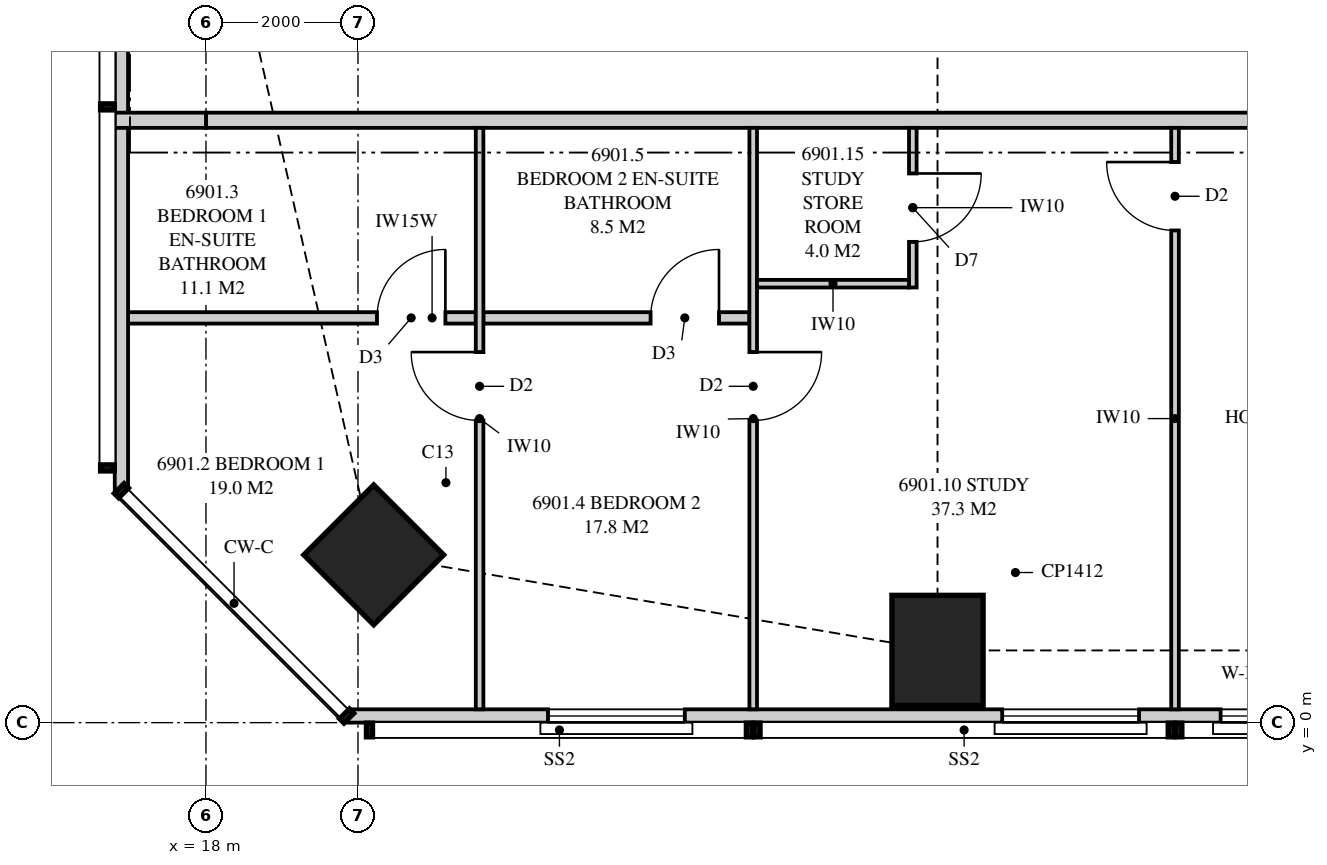
"""IFC4 building model, lengths in metres.
Left out: names, types, materials, properties, quantities, classifications, styles, units other than length and angle.
Written with IfcOpenShell. Run it as: python <this file> out.ifc"""

import sys

from ifc_helpers import new_model, si_unit, direction, frame, frame_2d, origin, origin_2d, place, context, subcontext, project, spatial, polyline, rectangle, outline, extrude, element, fill, save


model = new_model("IFC4")
c1 = context("Model", 3, precision=1e-05, world=origin(), true_north=direction((0.0, 1.0)))
c2 = subcontext(c1, "Body", "Model", "MODEL_VIEW")
j1 = project(units=[si_unit("LENGTHUNIT", "METRE"), si_unit("PLANEANGLEUNIT", "RADIAN")], contexts=[c1])
p1 = place(None, origin())
s1 = spatial("IfcSite", under=j1, at=p1, CompositionType="ELEMENT")
p2 = place(p1, origin())
s2 = spatial("IfcBuilding", under=s1, at=p2, CompositionType="ELEMENT")
p3 = place(p2, frame((0.0, 0.0, 252.95)))
s3 = spatial("IfcBuildingStorey", under=s2, at=p3, CompositionType="ELEMENT", Elevation=252.95)
p4 = place(p3, frame((20.207, 2.207, 0.0), z_axis=(0.0, 0.0, 1.0), x_axis=(0.707106781187, 0.707106781187, 0.0)))
e1 = element("IfcColumn", 1, at=p4, inside=s3, PredefinedType="COLUMN", context=c2, shape_type="SweptSolid", body=[
    extrude(rectangle(XDim=1.3, YDim=1.3, at=origin_2d()), origin(), (0.0, 0.0, 1.0), 3.5),
])
p5 = place(p3, frame((27.625, 0.95, 0.0), z_axis=(0.0, 0.0, 1.0), x_axis=(0.0, 1.0, 0.0)))
e2 = element("IfcColumn", 2, at=p5, inside=s3, PredefinedType="COLUMN", context=c2, shape_type="SweptSolid", body=[
    extrude(rectangle(XDim=1.45, YDim=1.2, at=origin_2d()), origin(), (0.0, 0.0, 1.0), 3.5),
])
p6 = place(p3, frame((19.851, 0.087, 0.0), z_axis=(0.0, 0.0, 1.0), x_axis=(1.0, 0.0, 0.0)))
e3 = element("IfcWall", 3, at=p6, inside=s3, PredefinedType="SOLIDWALL", context=c2, shape_type="SweptSolid", body=[
    extrude(outline(polyline([(0.0, 0.0), (33.597, 0.0), (33.597, 3.26), (27.239, 3.26), (27.239, 2.3), (27.155, 2.3), (27.155, 3.26), (27.024, 3.26), (27.024, 2.3), (7.774, 2.3), (7.774, 3.26), (7.642, 3.26), (7.642, 2.3), (7.559, 2.3), (7.559, 3.26), (0.0, 3.26), (0.0, 0.0)])), frame((0.0, 0.087, 0.0), z_axis=(0.0, -1.0, 0.0), x_axis=(1.0, 0.0, 0.0)), (0.0, 0.0, 1.0), 0.175),
])
p7 = place(p6, frame((2.649, 0.0, 0.4)))
e4 = element("IfcOpeningElement", 4, at=p7, cuts=e3, PredefinedType="OPENING", context=c2, shape_type="SweptSolid", body=[
    extrude(rectangle(XDim=1.8, YDim=1.85, at=frame_2d((0.9, 0.925))), frame((0.0, 0.097, 0.0), z_axis=(0.0, -1.0, 0.0), x_axis=(1.0, 0.0, 0.0)), (0.0, 0.0, 1.0), 0.195),
])
p8 = place(p6, frame((8.625, 0.0, 0.4)))
e5 = element("IfcOpeningElement", 5, at=p8, cuts=e3, PredefinedType="OPENING", context=c2, shape_type="SweptSolid", body=[
    extrude(rectangle(XDim=1.8, YDim=1.85, at=frame_2d((0.9, 0.925))), frame((0.0, 0.097, 0.0), z_axis=(0.0, -1.0, 0.0), x_axis=(1.0, 0.0, 0.0)), (0.0, 0.0, 1.0), 0.195),
])
p9 = place(p6, frame((11.499, 0.0, 0.4)))
e6 = element("IfcOpeningElement", 6, at=p9, cuts=e3, PredefinedType="OPENING", context=c2, shape_type="SweptSolid", body=[
    extrude(rectangle(XDim=1.8, YDim=1.85, at=frame_2d((0.9, 0.925))), frame((0.0, 0.097, 0.0), z_axis=(0.0, -1.0, 0.0), x_axis=(1.0, 0.0, 0.0)), (0.0, 0.0, 1.0), 0.195),
])
p10 = place(p6, frame((14.359, 0.0, 0.0)))
e7 = element("IfcOpeningElement", 7, at=p10, cuts=e3, PredefinedType="OPENING", context=c2, shape_type="SweptSolid", body=[
    extrude(rectangle(XDim=1.8, YDim=2.25, at=frame_2d((0.9, 1.125))), frame((0.0, 0.097, 0.0), z_axis=(0.0, -1.0, 0.0), x_axis=(1.0, 0.0, 0.0)), (0.0, 0.0, 1.0), 0.195),
])
p11 = place(p6, frame((19.299, 0.0, 0.4)))
e8 = element("IfcOpeningElement", 8, at=p11, cuts=e3, PredefinedType="OPENING", context=c2, shape_type="SweptSolid", body=[
    extrude(rectangle(XDim=1.8, YDim=1.85, at=frame_2d((0.9, 0.925))), frame((0.0, 0.097, 0.0), z_axis=(0.0, -1.0, 0.0), x_axis=(1.0, 0.0, 0.0)), (0.0, 0.0, 1.0), 0.195),
])
p12 = place(p6, frame((23.674, 0.0, 0.4)))
e9 = element("IfcOpeningElement", 9, at=p12, cuts=e3, PredefinedType="OPENING", context=c2, shape_type="SweptSolid", body=[
    extrude(rectangle(XDim=2.4, YDim=1.85, at=frame_2d((1.2, 0.925))), frame((0.0, 0.097, 0.0), z_axis=(0.0, -1.0, 0.0), x_axis=(1.0, 0.0, 0.0)), (0.0, 0.0, 1.0), 0.195),
])
p13 = place(p6, frame((30.349, 0.0, 0.4)))
e10 = element("IfcOpeningElement", 10, at=p13, cuts=e3, PredefinedType="OPENING", context=c2, shape_type="SweptSolid", body=[
    extrude(rectangle(XDim=1.8, YDim=1.85, at=frame_2d((0.9, 0.925))), frame((0.0, 0.097, 0.0), z_axis=(0.0, -1.0, 0.0), x_axis=(1.0, 0.0, 0.0)), (0.0, 0.0, 1.0), 0.195),
])
p14 = place(p3, frame((16.887, 30.949, 0.0), z_axis=(0.0, 0.0, 1.0), x_axis=(0.0, -1.0, 0.0)))
e11 = element("IfcWall", 11, at=p14, inside=s3, PredefinedType="SOLIDWALL", context=c2, shape_type="SweptSolid", body=[
    extrude(outline(polyline([(0.0, 0.0), (27.897, 0.0), (27.897, 3.26), (18.148, 3.26), (18.148, 2.3), (18.125, 2.3), (18.125, 3.26), (17.949, 3.26), (17.949, 2.3), (5.949, 2.3), (5.949, 3.26), (0.0, 3.26), (0.0, 0.0)])), frame((0.0, 0.087, 0.0), z_axis=(0.0, -1.0, 0.0), x_axis=(1.0, 0.0, 0.0)), (0.0, 0.0, 1.0), 0.175),
])
p15 = place(p14, frame((11.849, 0.0, 0.4)))
e12 = element("IfcOpeningElement", 12, at=p15, cuts=e11, PredefinedType="OPENING", context=c2, shape_type="SweptSolid", body=[
    extrude(rectangle(XDim=1.2, YDim=1.85, at=frame_2d((0.6, 0.925))), frame((0.0, 0.097, 0.0), z_axis=(0.0, -1.0, 0.0), x_axis=(1.0, 0.0, 0.0)), (0.0, 0.0, 1.0), 0.195),
])
p16 = place(p3, frame((18.0, 7.925, 0.0), z_axis=(0.0, 0.0, 1.0), x_axis=(1.0, 0.0, 0.0)))
e13 = element("IfcWall", 13, at=p16, inside=s3, PredefinedType="PARTITIONING", context=c2, shape_type="SweptSolid", body=[
    extrude(outline(polyline([(0.0, 0.0), (38.325, 0.0), (38.325, 3.26), (37.875, 3.26), (37.875, 2.3), (36.043, 2.3), (36.043, 3.26), (30.185, 3.26), (30.185, 2.66), (27.565, 2.66), (27.565, 3.26), (20.56, 3.26), (20.56, 2.66), (17.94, 2.66), (17.94, 3.26), (10.935, 3.26), (10.935, 2.66), (8.315, 2.66), (8.315, 3.26), (1.839, 3.26), (1.839, 2.3), (0.0, 2.3), (0.0, 3.26), (0.0, 0.0)])), frame((0.0, 0.1, 0.0), z_axis=(0.0, -1.0, 0.0), x_axis=(1.0, 0.0, 0.0)), (0.0, 0.0, 1.0), 0.2),
])
p17 = place(p16, frame((18.75, 0.0, 0.0)))
e14 = element("IfcOpeningElement", 14, at=p17, cuts=e13, PredefinedType="OPENING", context=c2, shape_type="SweptSolid", body=[
    extrude(rectangle(XDim=1.05, YDim=2.2, at=frame_2d((0.525, 1.1))), frame((0.0, 0.11, 0.0), z_axis=(0.0, -1.0, 0.0), x_axis=(1.0, 0.0, 0.0)), (0.0, 0.0, 1.0), 0.22),
])
p18 = place(p3, frame((21.6, 0.175, 0.0), z_axis=(0.0, 0.0, 1.0), x_axis=(0.0, 1.0, 0.0)))
e15 = element("IfcWall", 15, at=p18, inside=s3, PredefinedType="PARTITIONING", context=c2, shape_type="SweptSolid", body=[
    extrude(outline(polyline([(0.0, 0.0), (7.65, 0.0), (7.65, 3.26), (2.668, 3.26), (2.668, 2.3), (0.924, 2.3), (0.924, 3.26), (0.0, 3.26), (0.0, 0.0)])), frame((0.0, 0.05, 0.0), z_axis=(0.0, -1.0, 0.0), x_axis=(1.0, 0.0, 0.0)), (0.0, 0.0, 1.0), 0.1),
])
p19 = place(p18, frame((3.8, 0.0, 0.0)))
e16 = element("IfcOpeningElement", 16, at=p19, cuts=e15, PredefinedType="OPENING", context=c2, shape_type="SweptSolid", body=[
    extrude(rectangle(XDim=0.9, YDim=2.1, at=frame_2d((0.45, 1.05))), frame((0.0, 0.06, 0.0), z_axis=(0.0, -1.0, 0.0), x_axis=(1.0, 0.0, 0.0)), (0.0, 0.0, 1.0), 0.12),
])
p20 = place(p3, frame((25.2, 0.175, 0.0), z_axis=(0.0, 0.0, 1.0), x_axis=(0.0, 1.0, 0.0)))
e17 = element("IfcWall", 17, at=p20, inside=s3, PredefinedType="PARTITIONING", context=c2, shape_type="SweptSolid", body=[
    extrude(outline(polyline([(0.0, 0.0), (7.65, 0.0), (7.65, 3.26), (2.058, 3.26), (2.058, 2.3), (0.314, 2.3), (0.314, 3.26), (0.0, 3.26), (0.0, 0.0)])), frame((0.0, 0.05, 0.0), z_axis=(0.0, -1.0, 0.0), x_axis=(1.0, 0.0, 0.0)), (0.0, 0.0, 1.0), 0.1),
])
p21 = place(p20, frame((3.8, 0.0, 0.0)))
e18 = element("IfcOpeningElement", 18, at=p21, cuts=e17, PredefinedType="OPENING", context=c2, shape_type="SweptSolid", body=[
    extrude(rectangle(XDim=0.9, YDim=2.1, at=frame_2d((0.45, 1.05))), frame((0.0, 0.06, 0.0), z_axis=(0.0, -1.0, 0.0), x_axis=(1.0, 0.0, 0.0)), (0.0, 0.0, 1.0), 0.12),
])
p22 = place(p3, frame((16.8, 5.325, 0.0), z_axis=(0.0, 0.0, 1.0), x_axis=(1.0, 0.0, 0.0)))
e19 = element("IfcWall", 19, at=p22, inside=s3, PredefinedType="PLUMBINGWALL", context=c2, shape_type="SweptSolid", body=[
    extrude(outline(polyline([(0.0, 0.0), (4.75, 0.0), (4.75, 3.26), (3.605, 3.26), (3.605, 2.3), (1.79, 2.3), (1.79, 3.26), (0.0, 3.26), (0.0, 0.0)])), frame((0.0, 0.075, 0.0), z_axis=(0.0, -1.0, 0.0), x_axis=(1.0, 0.0, 0.0)), (0.0, 0.0, 1.0), 0.15),
])
p23 = place(p22, frame((3.45, 0.0, 0.0)))
e20 = element("IfcOpeningElement", 20, at=p23, cuts=e19, PredefinedType="OPENING", context=c2, shape_type="SweptSolid", body=[
    extrude(rectangle(XDim=0.9, YDim=2.1, at=frame_2d((0.45, 1.05))), frame((0.0, 0.085, 0.0), z_axis=(0.0, -1.0, 0.0), x_axis=(1.0, 0.0, 0.0)), (0.0, 0.0, 1.0), 0.17),
])
p24 = place(p3, frame((21.65, 5.325, 0.0), z_axis=(0.0, 0.0, 1.0), x_axis=(1.0, 0.0, 0.0)))
e21 = element("IfcWall", 21, at=p24, inside=s3, PredefinedType="PLUMBINGWALL", context=c2, shape_type="SweptSolid", body=[
    extrude(rectangle(XDim=3.5, YDim=0.15, at=frame_2d((1.75, 0.0))), origin(), (0.0, 0.0, 1.0), 3.26),
])
p25 = place(p24, frame((2.2, 0.0, 0.0)))
e22 = element("IfcOpeningElement", 22, at=p25, cuts=e21, PredefinedType="OPENING", context=c2, shape_type="SweptSolid", body=[
    extrude(rectangle(XDim=0.9, YDim=2.1, at=frame_2d((0.45, 1.05))), frame((0.0, 0.085, 0.0), z_axis=(0.0, -1.0, 0.0), x_axis=(1.0, 0.0, 0.0)), (0.0, 0.0, 1.0), 0.17),
])
p26 = place(p3, frame((30.75, 0.175, 0.0), z_axis=(0.0, 0.0, 1.0), x_axis=(0.0, 1.0, 0.0)))
e23 = element("IfcWall", 23, at=p26, inside=s3, PredefinedType="PARTITIONING", context=c2, shape_type="SweptSolid", body=[
    extrude(outline(polyline([(0.0, 0.0), (7.65, 0.0), (7.65, 3.26), (1.635, 3.26), (1.635, 2.3), (0.0, 2.3), (0.0, 3.26), (0.0, 0.0)])), frame((0.0, 0.05, 0.0), z_axis=(0.0, -1.0, 0.0), x_axis=(1.0, 0.0, 0.0)), (0.0, 0.0, 1.0), 0.1),
])
p27 = place(p26, frame((6.3, 0.0, 0.0)))
e24 = element("IfcOpeningElement", 24, at=p27, cuts=e23, PredefinedType="OPENING", context=c2, shape_type="SweptSolid", body=[
    extrude(rectangle(XDim=0.9, YDim=2.1, at=frame_2d((0.45, 1.05))), frame((0.0, 0.06, 0.0), z_axis=(0.0, -1.0, 0.0), x_axis=(1.0, 0.0, 0.0)), (0.0, 0.0, 1.0), 0.12),
])
p28 = place(p3, frame((16.8, 7.925, 0.0), z_axis=(0.0, 0.0, 1.0), x_axis=(1.0, 0.0, 0.0)))
e25 = element("IfcWall", 25, at=p28, inside=s3, PredefinedType="PARTITIONING", context=c2, shape_type="SweptSolid", body=[
    extrude(outline(polyline([(0.0, 0.0), (1.2, 0.0), (1.2, 3.26), (1.2, 2.3), (1.172, 2.3), (1.172, 3.26), (0.0, 3.26), (0.0, 0.0)])), frame((0.0, 0.1, 0.0), z_axis=(0.0, -1.0, 0.0), x_axis=(1.0, 0.0, 0.0)), (0.0, 0.0, 1.0), 0.2),
])
p29 = place(p3, frame((27.3, 7.825, 0.0), z_axis=(0.0, 0.0, 1.0), x_axis=(0.0, -1.0, 0.0)))
e26 = element("IfcWall", 26, at=p29, inside=s3, PredefinedType="PARTITIONING", context=c2, shape_type="SweptSolid", body=[
    extrude(outline(polyline([(0.0, 0.0), (2.1, 0.0), (2.1, 3.26), (2.1, 2.66), (0.0, 2.66), (0.0, 3.26), (0.0, 0.0)])), frame((0.0, 0.05, 0.0), z_axis=(0.0, -1.0, 0.0), x_axis=(1.0, 0.0, 0.0)), (0.0, 0.0, 1.0), 0.1),
])
p30 = place(p29, frame((0.6, 0.0, 0.0)))
e27 = element("IfcOpeningElement", 27, at=p30, cuts=e26, PredefinedType="OPENING", context=c2, shape_type="SweptSolid", body=[
    extrude(rectangle(XDim=0.9, YDim=2.1, at=frame_2d((0.45, 1.05))), frame((0.0, 0.06, 0.0), z_axis=(0.0, -1.0, 0.0), x_axis=(1.0, 0.0, 0.0)), (0.0, 0.0, 1.0), 0.12),
])
p31 = place(p3, frame((25.25, 5.775, 0.0), z_axis=(0.0, 0.0, 1.0), x_axis=(1.0, 0.0, 0.0)))
e28 = element("IfcWall", 28, at=p31, inside=s3, PredefinedType="PARTITIONING", context=c2, shape_type="SweptSolid", body=[
    extrude(outline(polyline([(0.0, 0.0), (2.0, 0.0), (2.0, 3.26), (2.0, 2.66), (1.115, 2.66), (1.115, 3.26), (0.0, 3.26), (0.0, 0.0)])), frame((0.0, 0.05, 0.0), z_axis=(0.0, -1.0, 0.0), x_axis=(1.0, 0.0, 0.0)), (0.0, 0.0, 1.0), 0.1),
])
p32 = place(p7, origin())
e29 = element("IfcWindow", 29, at=p32, inside=s3, PartitioningType="SINGLE_PANEL", PredefinedType="WINDOW", context=c2, shape_type="SweptSolid", body=[
    extrude(rectangle(XDim=1.8, YDim=1.85, at=frame_2d((0.9, 0.925))), frame((0.0, 0.03, 0.0), z_axis=(0.0, -1.0, 0.0), x_axis=(1.0, 0.0, 0.0)), (0.0, 0.0, 1.0), 0.06),
])
fill(e4, e29)
p33 = place(p8, origin())
e30 = element("IfcWindow", 30, at=p33, inside=s3, PartitioningType="SINGLE_PANEL", PredefinedType="WINDOW", context=c2, shape_type="SweptSolid", body=[
    extrude(rectangle(XDim=1.8, YDim=1.85, at=frame_2d((0.9, 0.925))), frame((0.0, 0.03, 0.0), z_axis=(0.0, -1.0, 0.0), x_axis=(1.0, 0.0, 0.0)), (0.0, 0.0, 1.0), 0.06),
])
fill(e5, e30)
p34 = place(p9, origin())
e31 = element("IfcWindow", 31, at=p34, inside=s3, PartitioningType="SINGLE_PANEL", PredefinedType="WINDOW", context=c2, shape_type="SweptSolid", body=[
    extrude(rectangle(XDim=1.8, YDim=1.85, at=frame_2d((0.9, 0.925))), frame((0.0, 0.03, 0.0), z_axis=(0.0, -1.0, 0.0), x_axis=(1.0, 0.0, 0.0)), (0.0, 0.0, 1.0), 0.06),
])
fill(e6, e31)
p35 = place(p19, origin())
e32 = element("IfcDoor", 32, at=p35, inside=s3, OperationType="SINGLE_SWING_RIGHT", PredefinedType="DOOR", context=c2, shape_type="SweptSolid", body=[
    extrude(rectangle(XDim=0.9, YDim=2.1, at=frame_2d((0.45, 1.05))), frame((0.0, 0.025, 0.0), z_axis=(0.0, -1.0, 0.0), x_axis=(1.0, 0.0, 0.0)), (0.0, 0.0, 1.0), 0.05),
])
fill(e16, e32)
p36 = place(p23, origin())
e33 = element("IfcDoor", 33, at=p36, inside=s3, OperationType="SINGLE_SWING_RIGHT", PredefinedType="DOOR", context=c2, shape_type="SweptSolid", body=[
    extrude(rectangle(XDim=0.9, YDim=2.1, at=frame_2d((0.45, 1.05))), frame((0.0, 0.025, 0.0), z_axis=(0.0, -1.0, 0.0), x_axis=(1.0, 0.0, 0.0)), (0.0, 0.0, 1.0), 0.05),
])
fill(e20, e33)
p37 = place(p21, frame((0.9, 0.0, 0.0), z_axis=(0.0, 0.0, 1.0), x_axis=(-1.0, 0.0, 0.0)))
e34 = element("IfcDoor", 34, at=p37, inside=s3, OperationType="SINGLE_SWING_LEFT", PredefinedType="DOOR", context=c2, shape_type="SweptSolid", body=[
    extrude(rectangle(XDim=0.9, YDim=2.1, at=frame_2d((0.45, 1.05))), frame((0.0, 0.025, 0.0), z_axis=(0.0, -1.0, 0.0), x_axis=(1.0, 0.0, 0.0)), (0.0, 0.0, 1.0), 0.05),
])
fill(e18, e34)
p38 = place(p25, origin())
e35 = element("IfcDoor", 35, at=p38, inside=s3, OperationType="SINGLE_SWING_RIGHT", PredefinedType="DOOR", context=c2, shape_type="SweptSolid", body=[
    extrude(rectangle(XDim=0.9, YDim=2.1, at=frame_2d((0.45, 1.05))), frame((0.0, 0.025, 0.0), z_axis=(0.0, -1.0, 0.0), x_axis=(1.0, 0.0, 0.0)), (0.0, 0.0, 1.0), 0.05),
])
fill(e22, e35)
p39 = place(p27, origin())
e36 = element("IfcDoor", 36, at=p39, inside=s3, OperationType="SINGLE_SWING_RIGHT", PredefinedType="DOOR", context=c2, shape_type="SweptSolid", body=[
    extrude(rectangle(XDim=0.9, YDim=2.1, at=frame_2d((0.45, 1.05))), frame((0.0, 0.025, 0.0), z_axis=(0.0, -1.0, 0.0), x_axis=(1.0, 0.0, 0.0)), (0.0, 0.0, 1.0), 0.05),
])
fill(e24, e36)
p40 = place(p30, origin())
e37 = element("IfcDoor", 37, at=p40, inside=s3, OperationType="SINGLE_SWING_LEFT", PredefinedType="DOOR", context=c2, shape_type="SweptSolid", body=[
    extrude(rectangle(XDim=0.9, YDim=2.1, at=frame_2d((0.45, 1.05))), frame((0.0, 0.025, 0.0), z_axis=(0.0, -1.0, 0.0), x_axis=(1.0, 0.0, 0.0)), (0.0, 0.0, 1.0), 0.05),
])
fill(e27, e37)
save(model, sys.argv[1])
